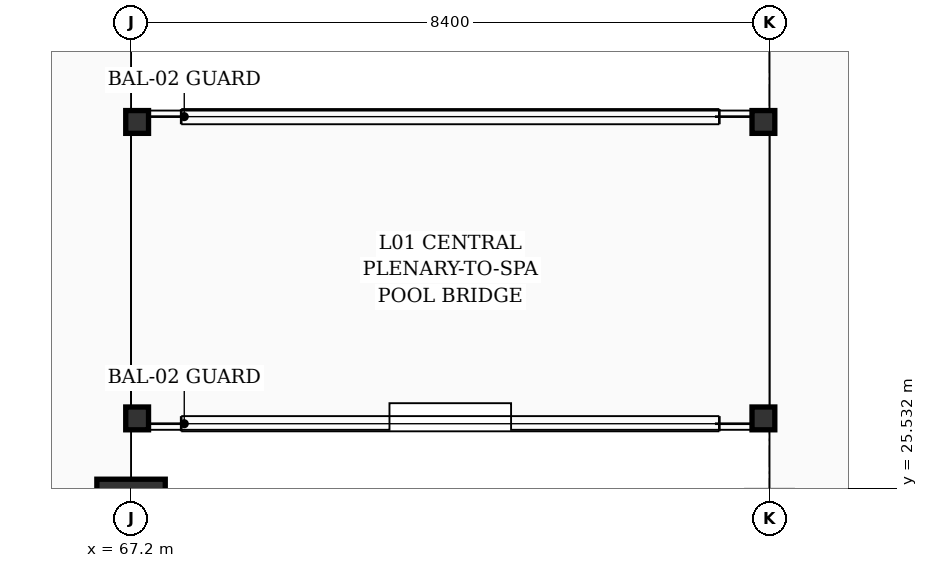
"""IFC4 building model, lengths in metres.
Left out: names, types, materials, properties, quantities, classifications, styles, units other than length and angle.
Written with IfcOpenShell. Run it as: python <this file> out.ifc"""

import sys

from ifc_helpers import new_model, si_unit, direction, frame, origin, origin_2d, place, context, subcontext, project, spatial, rectangle, hollow_rectangle, extrude, element, save


model = new_model("IFC4")
c1 = context("Model", 3, precision=1e-05, world=origin(), true_north=direction((0.0, 1.0)))
c2 = subcontext(c1, "Body", "Model", "MODEL_VIEW")
j1 = project(units=[si_unit("LENGTHUNIT", "METRE"), si_unit("PLANEANGLEUNIT", "RADIAN")], contexts=[c1])
p1 = place(None, origin())
s1 = spatial("IfcSite", under=j1, at=p1, CompositionType="ELEMENT")
p2 = place(p1, origin())
s2 = spatial("IfcBuilding", under=s1, at=p2, CompositionType="ELEMENT")
p3 = place(p2, frame((0.0, 0.0, 3.92)))
s3 = spatial("IfcBuildingStorey", under=s2, at=p3, CompositionType="ELEMENT", Elevation=3.92)
p4 = place(p3, frame((67.2, 25.2, 0.0), z_axis=(0.0, 0.0, 1.0), x_axis=(1.0, 0.0, 0.0)))
e1 = element("IfcColumn", 1, at=p4, inside=s3, PredefinedType="COLUMN", context=c2, shape_type="SweptSolid", body=[
    extrude(rectangle(XDim=0.9, YDim=0.9, at=origin_2d()), origin(), (0.0, 0.0, 1.0), 3.64),
])
for number, where, z_axis, x_axis in (
    (2, (67.28, 26.45, 0.0), (0.0, 0.0, 1.0), (1.0, 0.0, 0.0)),
    (3, (67.28, 30.35, 0.0), (0.0, 0.0, 1.0), (1.0, 0.0, 0.0)),
    (4, (75.52, 26.45, 0.0), (0.0, 0.0, 1.0), (1.0, 0.0, 0.0)),
    (5, (75.52, 30.35, 0.0), (0.0, 0.0, 1.0), (1.0, 0.0, 0.0)),
):
    element("IfcColumn", number, at=place(p3, frame(where, z_axis=z_axis, x_axis=x_axis)), inside=s3, PredefinedType="COLUMN", context=c2, shape_type="SweptSolid", body=[
        extrude(hollow_rectangle(XDim=0.3, YDim=0.3, WallThickness=0.016, at=origin_2d()), origin(), (0.0, 0.0, 1.0), 3.64),
    ])
save(model, sys.argv[1])
